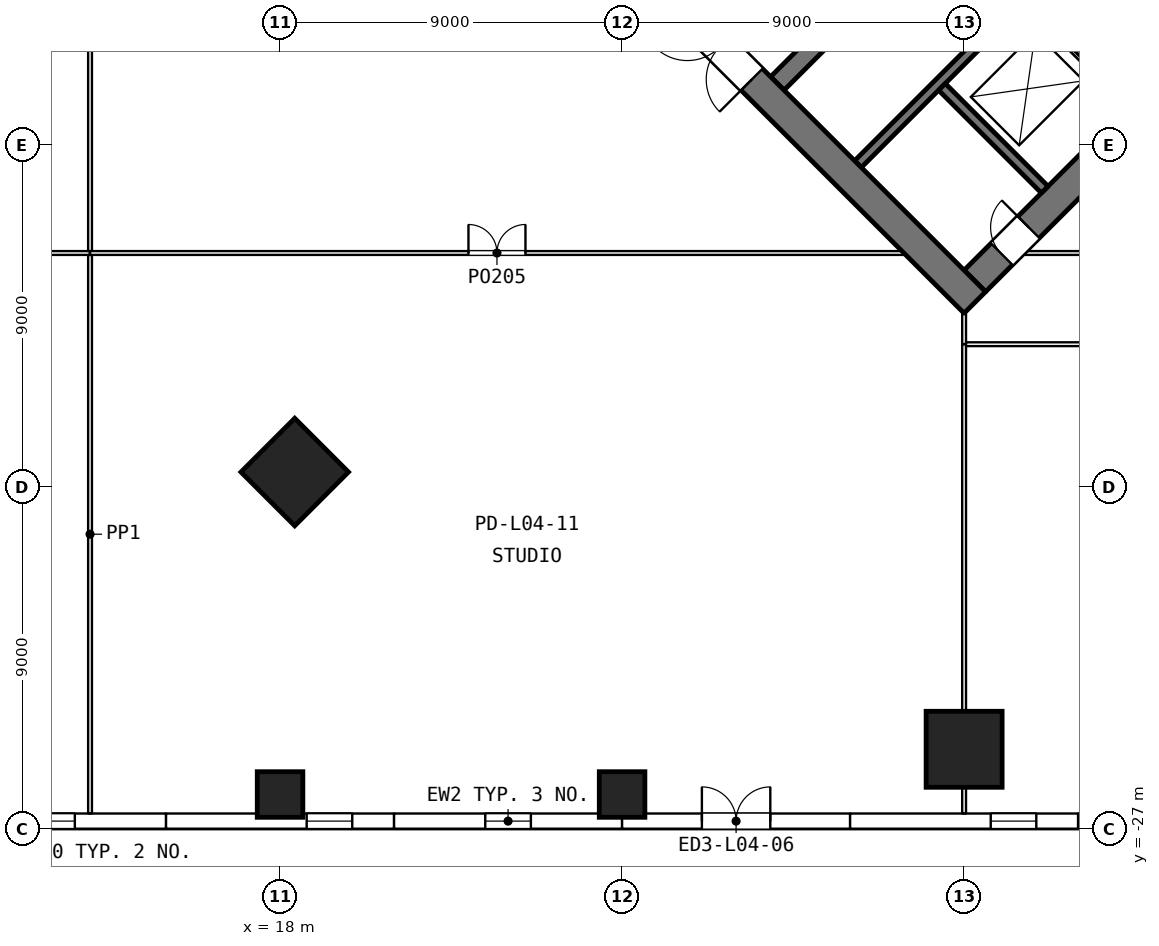
"""IFC4 building model, lengths in metres.
Left out: names, types, materials, properties, quantities, classifications, styles, units other than length and angle.
Written with IfcOpenShell. Run it as: python <this file> out.ifc"""

import sys

from ifc_helpers import new_model, si_unit, direction, frame, frame_2d, origin, origin_2d, place, context, subcontext, project, spatial, rectangle, extrude, element, fill, save


model = new_model("IFC4")
c1 = context("Model", 3, precision=1e-05, world=origin(), true_north=direction((0.0, 1.0)))
c2 = subcontext(c1, "Body", "Model", "MODEL_VIEW")
j1 = project(units=[si_unit("LENGTHUNIT", "METRE"), si_unit("PLANEANGLEUNIT", "RADIAN")], contexts=[c1])
p1 = place(None, origin())
s1 = spatial("IfcSite", under=j1, at=p1, CompositionType="ELEMENT")
p2 = place(p1, origin())
s2 = spatial("IfcBuilding", under=s1, at=p2, CompositionType="ELEMENT")
p3 = place(p2, frame((0.0, 0.0, 22.8)))
s3 = spatial("IfcBuildingStorey", under=s2, at=p3, CompositionType="ELEMENT", Elevation=22.8)
for number, where, z_axis, x_axis in (
    (1, (18.0, -26.1, 0.0), (0.0, 0.0, 1.0), (1.0, 0.0, 0.0)),
    (2, (27.0, -26.1, 0.0), (0.0, 0.0, 1.0), (1.0, 0.0, 0.0)),
):
    element("IfcColumn", number, at=place(p3, frame(where, z_axis=z_axis, x_axis=x_axis)), inside=s3, PredefinedType="COLUMN", context=c2, shape_type="SweptSolid", body=[
        extrude(rectangle(XDim=1.2, YDim=1.2, at=origin_2d()), origin(), (0.0, 0.0, 1.0), 4.8),
    ])
for number, where, z_axis, x_axis in (
    (3, (18.386, -17.614, 0.0), (0.0, 0.0, 1.0), (-0.707, -0.707, 0.0)),
    (4, (36.0, -24.91, 0.0), (0.0, 0.0, 1.0), (0.0, -1.0, 0.0)),
):
    element("IfcColumn", number, at=place(p3, frame(where, z_axis=z_axis, x_axis=x_axis)), inside=s3, PredefinedType="COLUMN", context=c2, shape_type="SweptSolid", body=[
        extrude(rectangle(XDim=2.0, YDim=2.0, at=origin_2d()), origin(), (0.0, 0.0, 1.0), 4.8),
    ])
p4 = place(p3, frame((9.0, -26.8, 0.0), z_axis=(0.0, 0.0, 1.0), x_axis=(1.0, 0.0, 0.0)))
e5 = element("IfcWall", 5, at=p4, inside=s3, PredefinedType="SOLIDWALL", context=c2, shape_type="SweptSolid", body=[
    extrude(rectangle(XDim=6.0, YDim=0.4, at=frame_2d((3.0, 0.0))), origin(), (0.0, 0.0, 1.0), 4.5),
])
p5 = place(p4, frame((2.4, 0.0, 1.1)))
e6 = element("IfcOpeningElement", 6, at=p5, cuts=e5, PredefinedType="OPENING", context=c2, shape_type="SweptSolid", body=[
    extrude(rectangle(XDim=1.2, YDim=1.8, at=frame_2d((0.6, 0.9))), frame((0.0, 0.21, 0.0), z_axis=(0.0, -1.0, 0.0), x_axis=(1.0, 0.0, 0.0)), (0.0, 0.0, 1.0), 0.42),
])
p6 = place(p3, frame((15.0, -26.8, 0.0), z_axis=(0.0, 0.0, 1.0), x_axis=(1.0, 0.0, 0.0)))
e7 = element("IfcWall", 7, at=p6, inside=s3, PredefinedType="SOLIDWALL", context=c2, shape_type="SweptSolid", body=[
    extrude(rectangle(XDim=6.0, YDim=0.4, at=frame_2d((3.0, 0.0))), origin(), (0.0, 0.0, 1.0), 4.5),
])
p7 = place(p6, frame((3.7, 0.0, 1.1)))
e8 = element("IfcOpeningElement", 8, at=p7, cuts=e7, PredefinedType="OPENING", context=c2, shape_type="SweptSolid", body=[
    extrude(rectangle(XDim=1.2, YDim=1.8, at=frame_2d((0.6, 0.9))), frame((0.0, 0.21, 0.0), z_axis=(0.0, -1.0, 0.0), x_axis=(1.0, 0.0, 0.0)), (0.0, 0.0, 1.0), 0.42),
])
p8 = place(p3, frame((21.0, -26.8, 0.0), z_axis=(0.0, 0.0, 1.0), x_axis=(1.0, 0.0, 0.0)))
e9 = element("IfcWall", 9, at=p8, inside=s3, PredefinedType="SOLIDWALL", context=c2, shape_type="SweptSolid", body=[
    extrude(rectangle(XDim=6.0, YDim=0.4, at=frame_2d((3.0, 0.0))), origin(), (0.0, 0.0, 1.0), 4.5),
])
p9 = place(p8, frame((2.4, 0.0, 1.1)))
e10 = element("IfcOpeningElement", 10, at=p9, cuts=e9, PredefinedType="OPENING", context=c2, shape_type="SweptSolid", body=[
    extrude(rectangle(XDim=1.2, YDim=1.8, at=frame_2d((0.6, 0.9))), frame((0.0, 0.21, 0.0), z_axis=(0.0, -1.0, 0.0), x_axis=(1.0, 0.0, 0.0)), (0.0, 0.0, 1.0), 0.42),
])
p10 = place(p3, frame((27.0, -26.8, 0.0), z_axis=(0.0, 0.0, 1.0), x_axis=(1.0, 0.0, 0.0)))
e11 = element("IfcWall", 11, at=p10, inside=s3, PredefinedType="SOLIDWALL", context=c2, shape_type="SweptSolid", body=[
    extrude(rectangle(XDim=6.0, YDim=0.4, at=frame_2d((3.0, 0.0))), origin(), (0.0, 0.0, 1.0), 4.5),
])
p11 = place(p10, frame((2.1, 0.0, 0.0)))
e12 = element("IfcOpeningElement", 12, at=p11, cuts=e11, PredefinedType="OPENING", context=c2, shape_type="SweptSolid", body=[
    extrude(rectangle(XDim=1.8, YDim=2.4, at=frame_2d((0.9, 1.2))), frame((0.0, 0.21, 0.0), z_axis=(0.0, -1.0, 0.0), x_axis=(1.0, 0.0, 0.0)), (0.0, 0.0, 1.0), 0.42),
])
p12 = place(p3, frame((33.0, -26.8, 0.0), z_axis=(0.0, 0.0, 1.0), x_axis=(1.0, 0.0, 0.0)))
e13 = element("IfcWall", 13, at=p12, inside=s3, PredefinedType="SOLIDWALL", context=c2, shape_type="SweptSolid", body=[
    extrude(rectangle(XDim=6.0, YDim=0.4, at=frame_2d((3.0, 0.0))), origin(), (0.0, 0.0, 1.0), 4.5),
])
p13 = place(p12, frame((3.7, 0.0, 1.1)))
e14 = element("IfcOpeningElement", 14, at=p13, cuts=e13, PredefinedType="OPENING", context=c2, shape_type="SweptSolid", body=[
    extrude(rectangle(XDim=1.2, YDim=1.8, at=frame_2d((0.6, 0.9))), frame((0.0, 0.21, 0.0), z_axis=(0.0, -1.0, 0.0), x_axis=(1.0, 0.0, 0.0)), (0.0, 0.0, 1.0), 0.42),
])
p14 = place(p3, frame((39.0, -26.8, 0.0), z_axis=(0.0, 0.0, 1.0), x_axis=(1.0, 0.0, 0.0)))
e15 = element("IfcWall", 15, at=p14, inside=s3, PredefinedType="SOLIDWALL", context=c2, shape_type="SweptSolid", body=[
    extrude(rectangle(XDim=6.0, YDim=0.4, at=frame_2d((3.0, 0.0))), origin(), (0.0, 0.0, 1.0), 4.5),
])
p15 = place(p14, frame((2.4, 0.0, 1.1)))
e16 = element("IfcOpeningElement", 16, at=p15, cuts=e15, PredefinedType="OPENING", context=c2, shape_type="SweptSolid", body=[
    extrude(rectangle(XDim=1.2, YDim=1.8, at=frame_2d((0.6, 0.9))), frame((0.0, 0.21, 0.0), z_axis=(0.0, -1.0, 0.0), x_axis=(1.0, 0.0, 0.0)), (0.0, 0.0, 1.0), 0.42),
])
p16 = place(p3, frame((36.283, -12.586, 0.0), z_axis=(0.0, 0.0, 1.0), x_axis=(0.707106781187, 0.707106781187, 0.0)))
e17 = element("IfcWall", 17, at=p16, inside=s3, PredefinedType="SHEAR", context=c2, shape_type="SweptSolid", body=[
    extrude(rectangle(XDim=17.4, YDim=0.8, at=frame_2d((8.7, 0.0))), origin(), (0.0, 0.0, 1.0), 4.5),
])
p17 = place(p16, frame((7.3, 0.0, 0.0)))
e18 = element("IfcOpeningElement", 18, at=p17, cuts=e17, PredefinedType="OPENING", context=c2, shape_type="SweptSolid", body=[
    extrude(rectangle(XDim=1.2, YDim=2.1, at=frame_2d((0.6, 1.05))), frame((0.0, 0.41, 0.0), z_axis=(0.0, -1.0, 0.0), x_axis=(1.0, 0.0, 0.0)), (0.0, 0.0, 1.0), 0.82),
])
p18 = place(p16, frame((1.0, 0.0, 0.0)))
e19 = element("IfcOpeningElement", 19, at=p18, cuts=e17, PredefinedType="OPENING", context=c2, shape_type="SweptSolid", body=[
    extrude(rectangle(XDim=1.0, YDim=2.1, at=frame_2d((0.5, 1.05))), frame((0.0, 0.41, 0.0), z_axis=(0.0, -1.0, 0.0), x_axis=(1.0, 0.0, 0.0)), (0.0, 0.0, 1.0), 0.82),
])
p19 = place(p3, frame((33.207, -9.51, 0.0), z_axis=(0.0, 0.0, 1.0), x_axis=(0.707106781187, 0.707106781187, 0.0)))
e20 = element("IfcWall", 20, at=p19, inside=s3, PredefinedType="SHEAR", context=c2, shape_type="SweptSolid", body=[
    extrude(rectangle(XDim=17.4, YDim=0.25, at=frame_2d((8.7, 0.0))), origin(), (0.0, 0.0, 1.0), 4.5),
])
p20 = place(p3, frame((31.086, -7.389, 0.0), z_axis=(0.0, 0.0, 1.0), x_axis=(0.707106781187, 0.707106781187, 0.0)))
e21 = element("IfcWall", 21, at=p20, inside=s3, PredefinedType="SHEAR", context=c2, shape_type="SweptSolid", body=[
    extrude(rectangle(XDim=17.4, YDim=0.5, at=frame_2d((8.7, 0.0))), origin(), (0.0, 0.0, 1.0), 4.5),
])
p21 = place(p20, frame((12.45, 0.0, 0.0)))
e22 = element("IfcOpeningElement", 22, at=p21, cuts=e21, PredefinedType="OPENING", context=c2, shape_type="SweptSolid", body=[
    extrude(rectangle(XDim=1.2, YDim=2.1, at=frame_2d((0.6, 1.05))), frame((0.0, 0.26, 0.0), z_axis=(0.0, -1.0, 0.0), x_axis=(1.0, 0.0, 0.0)), (0.0, 0.0, 1.0), 0.52),
])
p22 = place(p20, frame((15.5, 0.0, 0.0)))
e23 = element("IfcOpeningElement", 23, at=p22, cuts=e21, PredefinedType="OPENING", context=c2, shape_type="SweptSolid", body=[
    extrude(rectangle(XDim=1.0, YDim=2.1, at=frame_2d((0.5, 1.05))), frame((0.0, 0.26, 0.0), z_axis=(0.0, -1.0, 0.0), x_axis=(1.0, 0.0, 0.0)), (0.0, 0.0, 1.0), 0.52),
])
p23 = place(p3, frame((36.283, -13.152, 0.0), z_axis=(0.0, 0.0, 1.0), x_axis=(-0.707106781187, 0.707106781187, 0.0)))
e24 = element("IfcWall", 24, at=p23, inside=s3, PredefinedType="SHEAR", context=c2, shape_type="SweptSolid", body=[
    extrude(rectangle(XDim=19.0, YDim=0.8, at=frame_2d((9.5, 0.0))), origin(), (0.0, 0.0, 1.0), 4.5),
])
p24 = place(p23, frame((8.3, 0.0, 0.0)))
e25 = element("IfcOpeningElement", 25, at=p24, cuts=e24, PredefinedType="OPENING", context=c2, shape_type="SweptSolid", body=[
    extrude(rectangle(XDim=2.4, YDim=2.1, at=frame_2d((1.2, 1.05))), frame((0.0, 0.41, 0.0), z_axis=(0.0, -1.0, 0.0), x_axis=(1.0, 0.0, 0.0)), (0.0, 0.0, 1.0), 0.82),
])
p25 = place(p3, frame((38.121, -10.182, 0.0), z_axis=(0.0, 0.0, 1.0), x_axis=(-0.707138693938, 0.707074866995, 0.0)))
e26 = element("IfcWall", 26, at=p25, inside=s3, PredefinedType="SHEAR", context=c2, shape_type="SweptSolid", body=[
    extrude(rectangle(XDim=3.825, YDim=0.25, at=frame_2d((1.913, 0.0))), origin(), (0.0, 0.0, 1.0), 4.5),
])
p26 = place(p3, frame((40.384, -7.92, 0.0), z_axis=(0.0, 0.0, 1.0), x_axis=(-0.707074866995, 0.707138693938, 0.0)))
e27 = element("IfcWall", 27, at=p26, inside=s3, PredefinedType="SHEAR", context=c2, shape_type="SweptSolid", body=[
    extrude(rectangle(XDim=3.825, YDim=0.25, at=frame_2d((1.913, 0.0))), origin(), (0.0, 0.0, 1.0), 4.5),
])
p27 = place(p26, frame((1.6, 0.0, 0.0)))
e28 = element("IfcOpeningElement", 28, at=p27, cuts=e27, PredefinedType="OPENING", context=c2, shape_type="SweptSolid", body=[
    extrude(rectangle(XDim=1.2, YDim=2.1, at=frame_2d((0.6, 1.05))), frame((0.0, 0.135, 0.0), z_axis=(0.0, -1.0, 0.0), x_axis=(1.0, 0.0, 0.0)), (0.0, 0.0, 1.0), 0.27),
])
p28 = place(p3, frame((-13.0, -11.85, 0.0), z_axis=(0.0, 0.0, 1.0), x_axis=(1.0, 0.0, 0.0)))
e29 = element("IfcWall", 29, at=p28, inside=s3, PredefinedType="PARTITIONING", context=c2, shape_type="SweptSolid", body=[
    extrude(rectangle(XDim=26.0, YDim=0.1, at=frame_2d((13.0, 0.0))), origin(), (0.0, 0.0, 1.0), 4.5),
])
p29 = place(p28, frame((12.1, 0.0, 0.0)))
e30 = element("IfcOpeningElement", 30, at=p29, cuts=e29, PredefinedType="OPENING", context=c2, shape_type="SweptSolid", body=[
    extrude(rectangle(XDim=1.8, YDim=2.1, at=frame_2d((0.9, 1.05))), frame((0.0, 0.06, 0.0), z_axis=(0.0, -1.0, 0.0), x_axis=(1.0, 0.0, 0.0)), (0.0, 0.0, 1.0), 0.12),
])
p30 = place(p3, frame((13.0, -11.8, 0.0), z_axis=(0.0, 0.0, 1.0), x_axis=(0.0, 1.0, 0.0)))
e31 = element("IfcWall", 31, at=p30, inside=s3, PredefinedType="PARTITIONING", context=c2, shape_type="SweptSolid", body=[
    extrude(rectangle(XDim=23.6, YDim=0.1, at=frame_2d((11.8, 0.0))), origin(), (0.0, 0.0, 1.0), 4.5),
])
p31 = place(p30, frame((13.55, 0.0, 0.0)))
e32 = element("IfcOpeningElement", 32, at=p31, cuts=e31, PredefinedType="OPENING", context=c2, shape_type="SweptSolid", body=[
    extrude(rectangle(XDim=1.8, YDim=2.1, at=frame_2d((0.9, 1.05))), frame((0.0, 0.06, 0.0), z_axis=(0.0, -1.0, 0.0), x_axis=(1.0, 0.0, 0.0)), (0.0, 0.0, 1.0), 0.12),
])
p32 = place(p3, frame((36.0, -14.25, 0.0), z_axis=(0.0, 0.0, 1.0), x_axis=(0.0, 1.0, 0.0)))
e33 = element("IfcWall", 33, at=p32, inside=s3, PredefinedType="PARTITIONING", context=c2, shape_type="SweptSolid", body=[
    extrude(rectangle(XDim=0.815, YDim=0.1, at=frame_2d((0.407, 0.0))), origin(), (0.0, 0.0, 1.0), 4.5),
])
p33 = place(p3, frame((36.0, -26.6, 0.0), z_axis=(0.0, 0.0, 1.0), x_axis=(0.0, 1.0, 0.0)))
e34 = element("IfcWall", 34, at=p33, inside=s3, PredefinedType="PARTITIONING", context=c2, shape_type="SweptSolid", body=[
    extrude(rectangle(XDim=12.35, YDim=0.1, at=frame_2d((6.175, 0.0))), origin(), (0.0, 0.0, 1.0), 3.9),
])
p34 = place(p3, frame((13.0, -26.6, 0.0), z_axis=(0.0, 0.0, 1.0), x_axis=(0.0, 1.0, 0.0)))
e35 = element("IfcWall", 35, at=p34, inside=s3, PredefinedType="PARTITIONING", context=c2, shape_type="SweptSolid", body=[
    extrude(rectangle(XDim=14.7, YDim=0.1, at=frame_2d((7.35, 0.0))), origin(), (0.0, 0.0, 1.0), 4.5),
])
p35 = place(p3, frame((13.0, -11.85, 0.0), z_axis=(0.0, 0.0, 1.0), x_axis=(1.0, 0.0, 0.0)))
e36 = element("IfcWall", 36, at=p35, inside=s3, PredefinedType="PARTITIONING", context=c2, shape_type="SweptSolid", body=[
    extrude(rectangle(XDim=21.415, YDim=0.1, at=frame_2d((10.708, 0.0))), origin(), (0.0, 0.0, 1.0), 4.5),
])
p36 = place(p35, frame((9.958, 0.0, 0.0)))
e37 = element("IfcOpeningElement", 37, at=p36, cuts=e36, PredefinedType="OPENING", context=c2, shape_type="SweptSolid", body=[
    extrude(rectangle(XDim=1.5, YDim=2.1, at=frame_2d((0.75, 1.05))), frame((0.0, 0.06, 0.0), z_axis=(0.0, -1.0, 0.0), x_axis=(1.0, 0.0, 0.0)), (0.0, 0.0, 1.0), 0.12),
])
p37 = place(p3, frame((36.05, -14.25, 0.0), z_axis=(0.0, 0.0, 1.0), x_axis=(1.0, 0.0, 0.0)))
e38 = element("IfcWall", 38, at=p37, inside=s3, PredefinedType="PARTITIONING", context=c2, shape_type="SweptSolid", body=[
    extrude(rectangle(XDim=11.155, YDim=0.1, at=frame_2d((5.578, 0.0))), origin(), (0.0, 0.0, 1.0), 4.5),
])
p38 = place(p37, frame((5.127, 0.0, 0.0)))
e39 = element("IfcOpeningElement", 39, at=p38, cuts=e38, PredefinedType="OPENING", context=c2, shape_type="SweptSolid", body=[
    extrude(rectangle(XDim=0.9, YDim=2.1, at=frame_2d((0.45, 1.05))), frame((0.0, 0.06, 0.0), z_axis=(0.0, -1.0, 0.0), x_axis=(1.0, 0.0, 0.0)), (0.0, 0.0, 1.0), 0.12),
])
p39 = place(p3, frame((37.585, -11.85, 0.0), z_axis=(0.0, 0.0, 1.0), x_axis=(1.0, 0.0, 0.0)))
e40 = element("IfcWall", 40, at=p39, inside=s3, PredefinedType="PARTITIONING", context=c2, shape_type="SweptSolid", body=[
    extrude(rectangle(XDim=19.065, YDim=0.1, at=frame_2d((9.532, 0.0))), origin(), (0.0, 0.0, 1.0), 4.5),
])
p40 = place(p39, frame((8.782, 0.0, 0.0)))
e41 = element("IfcOpeningElement", 41, at=p40, cuts=e40, PredefinedType="OPENING", context=c2, shape_type="SweptSolid", body=[
    extrude(rectangle(XDim=1.5, YDim=2.1, at=frame_2d((0.75, 1.05))), frame((0.0, 0.06, 0.0), z_axis=(0.0, -1.0, 0.0), x_axis=(1.0, 0.0, 0.0)), (0.0, 0.0, 1.0), 0.12),
])
p41 = place(p39, frame((10.716, 0.0, 0.0)))
e42 = element("IfcOpeningElement", 42, at=p41, cuts=e40, PredefinedType="OPENING", context=c2, shape_type="SweptSolid", body=[
    extrude(rectangle(XDim=1.8, YDim=2.1, at=frame_2d((0.9, 1.05))), frame((0.0, 0.06, 0.0), z_axis=(0.0, -1.0, 0.0), x_axis=(1.0, 0.0, 0.0)), (0.0, 0.0, 1.0), 0.12),
])
p42 = place(p5, origin())
e43 = element("IfcWindow", 43, at=p42, inside=s3, PartitioningType="SINGLE_PANEL", PredefinedType="WINDOW", context=c2, shape_type="SweptSolid", body=[
    extrude(rectangle(XDim=1.2, YDim=1.8, at=frame_2d((0.6, 0.9))), frame((0.0, 0.03, 0.0), z_axis=(0.0, -1.0, 0.0), x_axis=(1.0, 0.0, 0.0)), (0.0, 0.0, 1.0), 0.06),
])
fill(e6, e43)
p43 = place(p7, origin())
e44 = element("IfcWindow", 44, at=p43, inside=s3, PartitioningType="SINGLE_PANEL", PredefinedType="WINDOW", context=c2, shape_type="SweptSolid", body=[
    extrude(rectangle(XDim=1.2, YDim=1.8, at=frame_2d((0.6, 0.9))), frame((0.0, 0.03, 0.0), z_axis=(0.0, -1.0, 0.0), x_axis=(1.0, 0.0, 0.0)), (0.0, 0.0, 1.0), 0.06),
])
fill(e8, e44)
p44 = place(p9, origin())
e45 = element("IfcWindow", 45, at=p44, inside=s3, PartitioningType="SINGLE_PANEL", PredefinedType="WINDOW", context=c2, shape_type="SweptSolid", body=[
    extrude(rectangle(XDim=1.2, YDim=1.8, at=frame_2d((0.6, 0.9))), frame((0.0, 0.03, 0.0), z_axis=(0.0, -1.0, 0.0), x_axis=(1.0, 0.0, 0.0)), (0.0, 0.0, 1.0), 0.06),
])
fill(e10, e45)
p45 = place(p11, origin())
e46 = element("IfcDoor", 46, at=p45, inside=s3, OperationType="SINGLE_SWING_LEFT", PredefinedType="DOOR", context=c2, shape_type="SweptSolid", body=[
    extrude(rectangle(XDim=1.8, YDim=2.4, at=frame_2d((0.9, 1.2))), frame((0.0, 0.025, 0.0), z_axis=(0.0, -1.0, 0.0), x_axis=(1.0, 0.0, 0.0)), (0.0, 0.0, 1.0), 0.05),
])
fill(e12, e46)
p46 = place(p13, origin())
e47 = element("IfcWindow", 47, at=p46, inside=s3, PartitioningType="SINGLE_PANEL", PredefinedType="WINDOW", context=c2, shape_type="SweptSolid", body=[
    extrude(rectangle(XDim=1.2, YDim=1.8, at=frame_2d((0.6, 0.9))), frame((0.0, 0.03, 0.0), z_axis=(0.0, -1.0, 0.0), x_axis=(1.0, 0.0, 0.0)), (0.0, 0.0, 1.0), 0.06),
])
fill(e14, e47)
p47 = place(p24, origin())
e48 = element("IfcDoor", 48, at=p47, inside=s3, OperationType="DOUBLE_DOOR_SINGLE_SWING", PredefinedType="DOOR", context=c2, shape_type="SweptSolid", body=[
    extrude(rectangle(XDim=2.4, YDim=2.1, at=frame_2d((1.2, 1.05))), frame((0.0, -0.225, 0.0), z_axis=(0.0, -1.0, 0.0), x_axis=(1.0, 0.0, 0.0)), (0.0, 0.0, 1.0), 0.05),
])
fill(e25, e48)
p48 = place(p27, origin())
e49 = element("IfcDoor", 49, at=p48, inside=s3, OperationType="SLIDING_TO_LEFT", PredefinedType="DOOR", context=c2, shape_type="SweptSolid", body=[
    extrude(rectangle(XDim=1.2, YDim=2.1, at=frame_2d((0.6, 1.05))), frame((0.0, 0.025, 0.0), z_axis=(0.0, -1.0, 0.0), x_axis=(1.0, 0.0, 0.0)), (0.0, 0.0, 1.0), 0.05),
])
fill(e28, e49)
p49 = place(p18, origin())
e50 = element("IfcDoor", 50, at=p49, inside=s3, OperationType="SINGLE_SWING_RIGHT", PredefinedType="DOOR", context=c2, shape_type="SweptSolid", body=[
    extrude(rectangle(XDim=1.0, YDim=2.1, at=frame_2d((0.5, 1.05))), frame((0.0, 0.275, 0.0), z_axis=(0.0, -1.0, 0.0), x_axis=(1.0, 0.0, 0.0)), (0.0, 0.0, 1.0), 0.05),
])
fill(e19, e50)
p50 = place(p36, origin())
e51 = element("IfcDoor", 51, at=p50, inside=s3, OperationType="DOUBLE_DOOR_DOUBLE_SWING", PredefinedType="DOOR", context=c2, shape_type="SweptSolid", body=[
    extrude(rectangle(XDim=1.5, YDim=2.1, at=frame_2d((0.75, 1.05))), frame((0.0, 0.025, 0.0), z_axis=(0.0, -1.0, 0.0), x_axis=(1.0, 0.0, 0.0)), (0.0, 0.0, 1.0), 0.05),
])
fill(e37, e51)
save(model, sys.argv[1])
